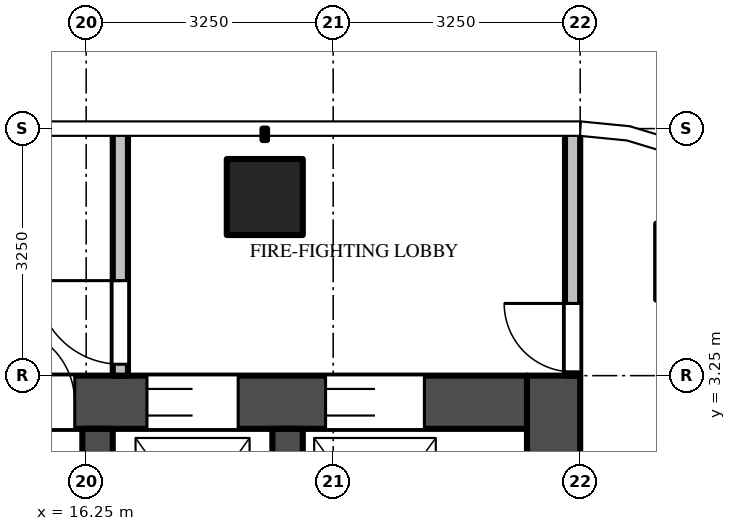
"""IFC4 building model, lengths in metres.
Left out: names, types, materials, properties, quantities, classifications, styles, units other than length and angle.
Written with IfcOpenShell. Run it as: python <this file> out.ifc"""

import sys

from ifc_helpers import new_model, si_unit, direction, frame, frame_2d, origin, origin_2d, place, context, subcontext, project, spatial, rectangle, extrude, source, transform, mapped, element, fill, save


model = new_model("IFC4")
c1 = context("Model", 3, precision=1e-05, world=origin(), true_north=direction((0.0, 1.0)))
c2 = subcontext(c1, "Body", "Model", "MODEL_VIEW")
j1 = project(units=[si_unit("LENGTHUNIT", "METRE"), si_unit("PLANEANGLEUNIT", "RADIAN")], contexts=[c1])
p1 = place(None, origin())
s1 = spatial("IfcSite", under=j1, at=p1, CompositionType="ELEMENT")
p2 = place(p1, origin())
s2 = spatial("IfcBuilding", under=s1, at=p2, CompositionType="ELEMENT")
p3 = place(p2, frame((0.0, 0.0, 279.4)))
s3 = spatial("IfcBuildingStorey", under=s2, at=p3, CompositionType="ELEMENT", Elevation=279.4)
m1 = source(origin(), c2, "Body", "SweptSolid", [
    extrude(rectangle(XDim=1.0, YDim=1.0, at=origin_2d()), origin(), (0.0, 0.0, 1.0), 3.9),
])
p4 = place(p3, frame((18.6, 5.6, 0.0), z_axis=(0.0, 0.0, 1.0), x_axis=(1.0, 0.0, 0.0)))
e1 = element("IfcColumn", 1, at=p4, inside=s3, PredefinedType="COLUMN", context=c2, shape_type="MappedRepresentation", body=[
    mapped(m1, transform((0.0, 0.0, 0.0))),
])
m2 = source(origin(), c2, "Body", "SweptSolid", [
    extrude(rectangle(XDim=14.85, YDim=0.7, at=frame_2d((7.425, 0.0))), origin(), (0.0, 0.0, 1.0), 3.7),
])
p5 = place(p3, frame((7.2, 2.9, 0.0), z_axis=(0.0, 0.0, 1.0), x_axis=(1.0, 0.0, 0.0)))
e2 = element("IfcWall", 2, at=p5, inside=s3, PredefinedType="SHEAR", context=c2, shape_type="MappedRepresentation", body=[
    mapped(m2, transform((0.0, 0.0, 0.0))),
])
m3 = source(origin(), c2, "Body", "SweptSolid", [
    extrude(rectangle(XDim=1.2, YDim=2.1, at=frame_2d((0.6, 1.05))), frame((0.0, 0.36, 0.0), z_axis=(0.0, -1.0, 0.0), x_axis=(1.0, 0.0, 0.0)), (0.0, 0.0, 1.0), 0.72),
])
p6 = place(p5, frame((5.7, 0.0, 0.0)))
e3 = element("IfcOpeningElement", 3, at=p6, cuts=e2, PredefinedType="OPENING", context=c2, shape_type="MappedRepresentation", body=[
    mapped(m3, transform((0.0, 0.0, 0.0))),
])
m4 = source(origin(), c2, "Body", "SweptSolid", [
    extrude(rectangle(XDim=1.3, YDim=2.1, at=frame_2d((0.65, 1.05))), frame((0.0, 0.36, 0.0), z_axis=(0.0, -1.0, 0.0), x_axis=(1.0, 0.0, 0.0)), (0.0, 0.0, 1.0), 0.72),
])
p7 = place(p5, frame((12.2, 0.0, 0.0)))
e4 = element("IfcOpeningElement", 4, at=p7, cuts=e2, PredefinedType="OPENING", context=c2, shape_type="MappedRepresentation", body=[
    mapped(m4, transform((0.0, 0.0, 0.0))),
])
p8 = place(p5, frame((9.85, 0.0, 0.0)))
e5 = element("IfcOpeningElement", 5, at=p8, cuts=e2, PredefinedType="OPENING", context=c2, shape_type="MappedRepresentation", body=[
    mapped(m3, transform((0.0, 0.0, 0.0))),
])
m5 = source(origin(), c2, "Body", "SweptSolid", [
    extrude(rectangle(XDim=1.0, YDim=2.1, at=frame_2d((0.5, 1.05))), frame((0.0, 0.36, 0.0), z_axis=(0.0, -1.0, 0.0), x_axis=(1.0, 0.0, 0.0)), (0.0, 0.0, 1.0), 0.72),
])
p9 = place(p5, frame((7.9, 0.0, 0.0)))
e6 = element("IfcOpeningElement", 6, at=p9, cuts=e2, PredefinedType="OPENING", context=c2, shape_type="MappedRepresentation", body=[
    mapped(m5, transform((0.0, 0.0, 0.0))),
])
m6 = source(origin(), c2, "Body", "SweptSolid", [
    extrude(rectangle(XDim=0.8, YDim=2.1, at=frame_2d((0.4, 1.05))), frame((0.0, 0.36, 0.0), z_axis=(0.0, -1.0, 0.0), x_axis=(1.0, 0.0, 0.0)), (0.0, 0.0, 1.0), 0.72),
])
p10 = place(p5, frame((0.212, 0.0, 0.0)))
e7 = element("IfcOpeningElement", 7, at=p10, cuts=e2, PredefinedType="OPENING", context=c2, shape_type="MappedRepresentation", body=[
    mapped(m6, transform((0.0, 0.0, 0.0))),
])
p11 = place(p5, frame((2.587, 0.0, 0.0)))
e8 = element("IfcOpeningElement", 8, at=p11, cuts=e2, PredefinedType="OPENING", context=c2, shape_type="MappedRepresentation", body=[
    mapped(m5, transform((0.0, 0.0, 0.0))),
])
m7 = source(origin(), c2, "Body", "SweptSolid", [
    extrude(rectangle(XDim=9.05, YDim=0.7, at=frame_2d((4.525, 0.0))), origin(), (0.0, 0.0, 1.0), 3.7),
])
p12 = place(p3, frame((22.4, -5.8, 0.0), z_axis=(0.0, 0.0, 1.0), x_axis=(0.0, 1.0, 0.0)))
e9 = element("IfcWall", 9, at=p12, inside=s3, PredefinedType="SHEAR", context=c2, shape_type="MappedRepresentation", body=[
    mapped(m7, transform((0.0, 0.0, 0.0))),
])
m8 = source(origin(), c2, "Body", "SweptSolid", [
    extrude(rectangle(XDim=2.45, YDim=0.4, at=frame_2d((1.225, 0.0))), origin(), (0.0, 0.0, 1.0), 3.7),
])
for number, where, z_axis, x_axis in (
    (10, (16.4, 0.1, 0.0), (0.0, 0.0, 1.0), (0.0, 1.0, 0.0)),
    (11, (18.9, 0.1, 0.0), (0.0, 0.0, 1.0), (0.0, 1.0, 0.0)),
):
    element("IfcWall", number, at=place(p3, frame(where, z_axis=z_axis, x_axis=x_axis)), inside=s3, PredefinedType="SHEAR", context=c2, shape_type="MappedRepresentation", body=[
        mapped(m8, transform((0.0, 0.0, 0.0))),
    ])
m9 = source(origin(), c2, "Body", "SweptSolid", [
    extrude(rectangle(XDim=3.25, YDim=0.2, at=frame_2d((1.625, 0.0))), origin(), (0.0, 0.0, 1.0), 3.7),
])
p13 = place(p3, frame((16.7, 3.25, 0.0), z_axis=(0.0, 0.0, 1.0), x_axis=(0.0, 1.0, 0.0)))
e12 = element("IfcWall", 12, at=p13, inside=s3, PredefinedType="PARTITIONING", context=c2, shape_type="MappedRepresentation", body=[
    mapped(m9, transform((0.0, 0.0, 0.0))),
])
m10 = source(origin(), c2, "Body", "SweptSolid", [
    extrude(rectangle(XDim=1.1, YDim=2.1, at=frame_2d((0.55, 1.05))), frame((0.0, 0.11, 0.0), z_axis=(0.0, -1.0, 0.0), x_axis=(1.0, 0.0, 0.0)), (0.0, 0.0, 1.0), 0.22),
])
p14 = place(p13, frame((0.15, 0.0, 0.0)))
e13 = element("IfcOpeningElement", 13, at=p14, cuts=e12, PredefinedType="OPENING", context=c2, shape_type="MappedRepresentation", body=[
    mapped(m10, transform((0.0, 0.0, 0.0))),
])
p15 = place(p3, frame((22.65, 3.25, 0.0), z_axis=(0.0, 0.0, 1.0), x_axis=(0.0, 1.0, 0.0)))
e14 = element("IfcWall", 14, at=p15, inside=s3, PredefinedType="PARTITIONING", context=c2, shape_type="MappedRepresentation", body=[
    mapped(m9, transform((0.0, 0.0, 0.0))),
])
m11 = source(origin(), c2, "Body", "SweptSolid", [
    extrude(rectangle(XDim=0.9, YDim=2.1, at=frame_2d((0.45, 1.05))), frame((0.0, 0.11, 0.0), z_axis=(0.0, -1.0, 0.0), x_axis=(1.0, 0.0, 0.0)), (0.0, 0.0, 1.0), 0.22),
])
p16 = place(p15, frame((0.05, 0.0, 0.0)))
e15 = element("IfcOpeningElement", 15, at=p16, cuts=e14, PredefinedType="OPENING", context=c2, shape_type="MappedRepresentation", body=[
    mapped(m11, transform((0.0, 0.0, 0.0))),
])
m12 = source(origin(), c2, "Body", "SweptSolid", [
    extrude(rectangle(XDim=1.3, YDim=2.1, at=frame_2d((0.65, 1.05))), frame((0.0, -0.275, 0.0), z_axis=(0.0, -1.0, 0.0), x_axis=(1.0, 0.0, 0.0)), (0.0, 0.0, 1.0), 0.05),
])
p17 = place(p7, origin())
e16 = element("IfcDoor", 16, at=p17, inside=s3, OperationType="DOUBLE_DOOR_SLIDING", PredefinedType="DOOR", context=c2, shape_type="MappedRepresentation", body=[
    mapped(m12, transform((0.0, 0.0, 0.0))),
])
fill(e4, e16)
m13 = source(origin(), c2, "Body", "SweptSolid", [
    extrude(rectangle(XDim=1.2, YDim=2.1, at=frame_2d((0.6, 1.05))), frame((0.0, -0.275, 0.0), z_axis=(0.0, -1.0, 0.0), x_axis=(1.0, 0.0, 0.0)), (0.0, 0.0, 1.0), 0.05),
])
p18 = place(p8, origin())
e17 = element("IfcDoor", 17, at=p18, inside=s3, OperationType="DOUBLE_DOOR_SLIDING", PredefinedType="DOOR", context=c2, shape_type="MappedRepresentation", body=[
    mapped(m13, transform((0.0, 0.0, 0.0))),
])
fill(e5, e17)
m14 = source(origin(), c2, "Body", "SweptSolid", [
    extrude(rectangle(XDim=1.0, YDim=2.1, at=frame_2d((0.5, 1.05))), frame((0.0, -0.275, 0.0), z_axis=(0.0, -1.0, 0.0), x_axis=(1.0, 0.0, 0.0)), (0.0, 0.0, 1.0), 0.05),
])
p19 = place(p9, origin())
e18 = element("IfcDoor", 18, at=p19, inside=s3, OperationType="SINGLE_SWING_LEFT", PredefinedType="DOOR", context=c2, shape_type="MappedRepresentation", body=[
    mapped(m14, transform((0.0, 0.0, 0.0))),
])
fill(e6, e18)
m15 = source(origin(), c2, "Body", "SweptSolid", [
    extrude(rectangle(XDim=1.1, YDim=2.1, at=frame_2d((0.55, 1.05))), frame((0.0, 0.025, 0.0), z_axis=(0.0, -1.0, 0.0), x_axis=(1.0, 0.0, 0.0)), (0.0, 0.0, 1.0), 0.05),
])
p20 = place(p14, origin())
e19 = element("IfcDoor", 19, at=p20, inside=s3, OperationType="SINGLE_SWING_RIGHT", PredefinedType="DOOR", context=c2, shape_type="MappedRepresentation", body=[
    mapped(m15, transform((0.0, 0.0, 0.0))),
])
fill(e13, e19)
m16 = source(origin(), c2, "Body", "SweptSolid", [
    extrude(rectangle(XDim=0.9, YDim=2.1, at=frame_2d((0.45, 1.05))), frame((0.0, 0.025, 0.0), z_axis=(0.0, -1.0, 0.0), x_axis=(1.0, 0.0, 0.0)), (0.0, 0.0, 1.0), 0.05),
])
p21 = place(p16, origin())
e20 = element("IfcDoor", 20, at=p21, inside=s3, OperationType="SINGLE_SWING_RIGHT", PredefinedType="DOOR", context=c2, shape_type="MappedRepresentation", body=[
    mapped(m16, transform((0.0, 0.0, 0.0))),
])
fill(e15, e20)
save(model, sys.argv[1])
